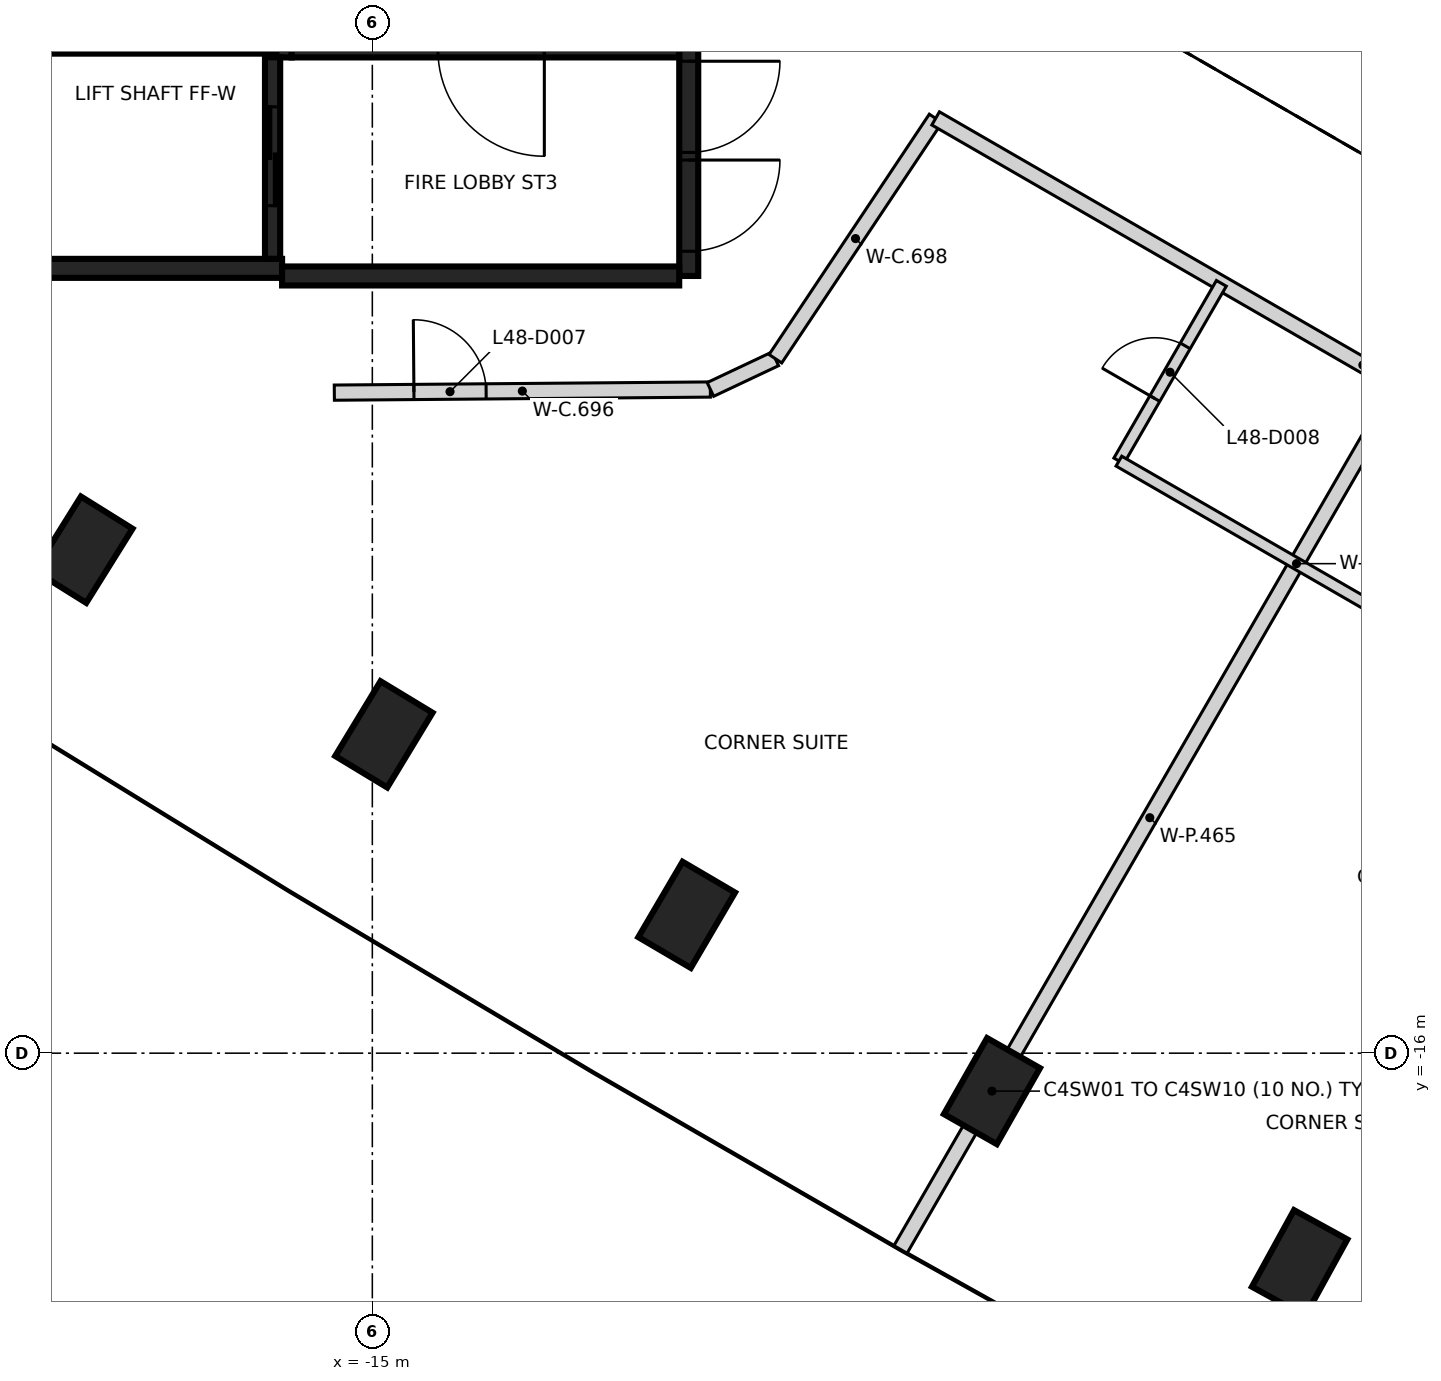
"""IFC4 building model, lengths in metres.
Left out: names, types, materials, properties, quantities, classifications, styles, units other than length and angle.
Written with IfcOpenShell. Run it as: python <this file> out.ifc"""

import sys

from ifc_helpers import new_model, si_unit, direction, frame, frame_2d, origin, origin_2d, place, context, subcontext, project, spatial, rectangle, extrude, element, fill, save


model = new_model("IFC4")
c1 = context("Model", 3, precision=1e-05, world=origin(), true_north=direction((0.0, 1.0)))
c2 = subcontext(c1, "Body", "Model", "MODEL_VIEW")
j1 = project(units=[si_unit("LENGTHUNIT", "METRE"), si_unit("PLANEANGLEUNIT", "RADIAN")], contexts=[c1])
p1 = place(None, origin())
s1 = spatial("IfcSite", under=j1, at=p1, CompositionType="ELEMENT")
p2 = place(p1, origin())
s2 = spatial("IfcBuilding", under=s1, at=p2, CompositionType="ELEMENT")
p3 = place(p2, frame((0.0, 0.0, 193.6)))
s3 = spatial("IfcBuildingStorey", under=s2, at=p3, CompositionType="ELEMENT", Elevation=193.6)
for number, where, z_axis, x_axis in (
    (1, (-18.799, -9.376, -0.35), (0.0, 0.0, 1.0), (0.529, 0.848, 0.0)),
    (2, (-14.848, -11.806, -0.35), (0.0, 0.0, 1.0), (0.518, 0.855, 0.0)),
    (3, (-10.864, -14.18, -0.35), (0.0, 0.0, 1.0), (0.506, 0.862, 0.0)),
    (4, (-6.848, -16.499, -0.35), (0.0, 0.0, 1.0), (0.494, 0.87, 0.0)),
    (5, (-2.8, -18.762, -0.35), (0.0, 0.0, 1.0), (0.482, 0.876, 0.0)),
):
    element("IfcColumn", number, at=place(p3, frame(where, z_axis=z_axis, x_axis=x_axis)), inside=s3, PredefinedType="COLUMN", context=c2, shape_type="SweptSolid", body=[
        extrude(rectangle(XDim=1.15, YDim=0.8, at=origin_2d()), origin(), (0.0, 0.0, 1.0), 3.6),
    ])
p4 = place(p3, frame((-10.837, 5.775, 0.0), z_axis=(0.0, 0.0, 1.0), x_axis=(0.0, -1.0, 0.0)))
e6 = element("IfcWall", 6, at=p4, inside=s3, PredefinedType="SHEAR", context=c2, shape_type="SweptSolid", body=[
    extrude(rectangle(XDim=11.55, YDim=0.25, at=frame_2d((5.775, 0.0))), origin(), (0.0, 0.0, 1.0), 3.25),
])
p5 = place(p4, frame((10.025, 0.0, 0.0)))
e7 = element("IfcOpeningElement", 7, at=p5, cuts=e6, PredefinedType="OPENING", context=c2, shape_type="SweptSolid", body=[
    extrude(rectangle(XDim=1.2, YDim=2.1, at=frame_2d((0.6, 1.05))), frame((0.0, 0.135, 0.0), z_axis=(0.0, -1.0, 0.0), x_axis=(1.0, 0.0, 0.0)), (0.0, 0.0, 1.0), 0.27),
])
p6 = place(p4, frame((8.725, 0.0, 0.0)))
e8 = element("IfcOpeningElement", 8, at=p6, cuts=e6, PredefinedType="OPENING", context=c2, shape_type="SweptSolid", body=[
    extrude(rectangle(XDim=1.2, YDim=2.1, at=frame_2d((0.6, 1.05))), frame((0.0, 0.135, 0.0), z_axis=(0.0, -1.0, 0.0), x_axis=(1.0, 0.0, 0.0)), (0.0, 0.0, 1.0), 0.27),
])
p7 = place(p3, frame((-16.187, -5.675, 0.0), z_axis=(0.0, 0.0, 1.0), x_axis=(-1.0, 0.0, 0.0)))
e9 = element("IfcWall", 9, at=p7, inside=s3, PredefinedType="SHEAR", context=c2, shape_type="SweptSolid", body=[
    extrude(rectangle(XDim=6.125, YDim=0.25, at=frame_2d((3.062, 0.0))), origin(), (0.0, 0.0, 1.0), 3.25),
])
p8 = place(p7, frame((3.563, 0.0, 0.0)))
e10 = element("IfcOpeningElement", 10, at=p8, cuts=e9, PredefinedType="OPENING", context=c2, shape_type="SweptSolid", body=[
    extrude(rectangle(XDim=1.0, YDim=2.1, at=frame_2d((0.5, 1.05))), frame((0.0, 0.135, 0.0), z_axis=(0.0, -1.0, 0.0), x_axis=(1.0, 0.0, 0.0)), (0.0, 0.0, 1.0), 0.27),
])
p9 = place(p3, frame((-10.963, -5.775, 0.0), z_axis=(0.0, 0.0, 1.0), x_axis=(-1.0, 0.0, 0.0)))
e11 = element("IfcWall", 11, at=p9, inside=s3, PredefinedType="SHEAR", context=c2, shape_type="SweptSolid", body=[
    extrude(rectangle(XDim=5.225, YDim=0.25, at=frame_2d((2.612, 0.0))), origin(), (0.0, 0.0, 1.0), 3.25),
])
p10 = place(p3, frame((-16.162, 3.074, 0.0), z_axis=(0.0, 0.0, 1.0), x_axis=(0.0, -1.0, 0.0)))
e12 = element("IfcWall", 12, at=p10, inside=s3, PredefinedType="SHEAR", context=c2, shape_type="SweptSolid", body=[
    extrude(rectangle(XDim=5.974, YDim=0.2, at=frame_2d((2.987, 0.0))), origin(), (0.0, 0.0, 1.0), 3.25),
])
p11 = place(p3, frame((-10.963, -2.8, 0.0), z_axis=(0.0, 0.0, 1.0), x_axis=(-1.0, 0.0, 0.0)))
e13 = element("IfcWall", 13, at=p11, inside=s3, PredefinedType="SHEAR", context=c2, shape_type="SweptSolid", body=[
    extrude(rectangle(XDim=5.098, YDim=0.2, at=frame_2d((2.549, 0.0))), origin(), (0.0, 0.0, 1.0), 3.25),
])
p12 = place(p11, frame((1.774, 0.0, 0.0)))
e14 = element("IfcOpeningElement", 14, at=p12, cuts=e13, PredefinedType="OPENING", context=c2, shape_type="SweptSolid", body=[
    extrude(rectangle(XDim=1.4, YDim=2.1, at=frame_2d((0.7, 1.05))), frame((0.0, 0.11, 0.0), z_axis=(0.0, -1.0, 0.0), x_axis=(1.0, 0.0, 0.0)), (0.0, 0.0, 1.0), 0.22),
])
p13 = place(p3, frame((-19.412, -2.75, 0.0), z_axis=(0.0, 0.0, 1.0), x_axis=(1.0, 0.0, 0.0)))
e15 = element("IfcWall", 15, at=p13, inside=s3, PredefinedType="SHEAR", context=c2, shape_type="SweptSolid", body=[
    extrude(rectangle(XDim=3.1, YDim=0.2, at=frame_2d((1.55, 0.0))), origin(), (0.0, 0.0, 1.0), 3.25),
])
p14 = place(p3, frame((-16.312, -2.898, 0.0), z_axis=(0.0, 0.0, 1.0), x_axis=(0.0, -1.0, 0.0)))
e16 = element("IfcWall", 16, at=p14, inside=s3, PredefinedType="SHEAR", context=c2, shape_type="SweptSolid", body=[
    extrude(rectangle(XDim=2.651, YDim=0.2, at=frame_2d((1.325, 0.0))), origin(), (0.0, 0.0, 1.0), 3.25),
])
p15 = place(p14, frame((0.652, 0.0, 0.0)))
e17 = element("IfcOpeningElement", 17, at=p15, cuts=e16, PredefinedType="OPENING", context=c2, shape_type="SweptSolid", body=[
    extrude(rectangle(XDim=1.3, YDim=2.1, at=frame_2d((0.65, 1.05))), frame((0.0, 0.11, 0.0), z_axis=(0.0, -1.0, 0.0), x_axis=(1.0, 0.0, 0.0)), (0.0, 0.0, 1.0), 0.22),
])
p16 = place(p3, frame((-15.5, -7.31, 0.0), z_axis=(0.0, 0.0, 1.0), x_axis=(0.999965631649, 0.008290688749, 0.0)))
e18 = element("IfcWall", 18, at=p16, inside=s3, PredefinedType="PARTITIONING", context=c2, shape_type="SweptSolid", body=[
    extrude(rectangle(XDim=4.947, YDim=0.2, at=frame_2d((2.474, 0.0))), origin(), (0.0, 0.0, 1.0), 3.25),
])
p17 = place(p16, frame((1.047, 0.0, 0.0)))
e19 = element("IfcOpeningElement", 19, at=p17, cuts=e18, PredefinedType="OPENING", context=c2, shape_type="SweptSolid", body=[
    extrude(rectangle(XDim=0.95, YDim=2.1, at=frame_2d((0.475, 1.05))), frame((0.0, 0.11, 0.0), z_axis=(0.0, -1.0, 0.0), x_axis=(1.0, 0.0, 0.0)), (0.0, 0.0, 1.0), 0.22),
])
p18 = place(p3, frame((-10.552, -7.268, 0.0), z_axis=(0.0, 0.0, 1.0), x_axis=(0.904331815333, 0.426830139255, 0.0)))
e20 = element("IfcWall", 20, at=p18, inside=s3, PredefinedType="PARTITIONING", context=c2, shape_type="SweptSolid", body=[
    extrude(rectangle(XDim=0.944, YDim=0.2, at=frame_2d((0.472, 0.0))), origin(), (0.0, 0.0, 1.0), 3.25),
])
p19 = place(p3, frame((-9.697, -6.864, 0.0), z_axis=(0.0, 0.0, 1.0), x_axis=(0.554670545446, 0.832070060761, 0.0)))
e21 = element("IfcWall", 21, at=p19, inside=s3, PredefinedType="PARTITIONING", context=c2, shape_type="SweptSolid", body=[
    extrude(rectangle(XDim=3.8, YDim=0.2, at=frame_2d((1.9, 0.0))), origin(), (0.0, 0.0, 1.0), 3.25),
])
p20 = place(p3, frame((-7.589, -3.702, 0.0), z_axis=(0.0, 0.0, 1.0), x_axis=(0.86602490244, -0.500000868353, 0.0)))
e22 = element("IfcWall", 22, at=p20, inside=s3, PredefinedType="PARTITIONING", context=c2, shape_type="SweptSolid", body=[
    extrude(rectangle(XDim=12.98, YDim=0.2, at=frame_2d((6.49, 0.0))), origin(), (0.0, 0.0, 1.0), 3.25),
])
p21 = place(p20, frame((11.8, 0.0, 0.0)))
e23 = element("IfcOpeningElement", 23, at=p21, cuts=e22, PredefinedType="OPENING", context=c2, shape_type="SweptSolid", body=[
    extrude(rectangle(XDim=0.95, YDim=2.1, at=frame_2d((0.475, 1.05))), frame((0.0, 0.11, 0.0), z_axis=(0.0, -1.0, 0.0), x_axis=(1.0, 0.0, 0.0)), (0.0, 0.0, 1.0), 0.22),
])
p22 = place(p3, frame((-8.051, -18.582, 0.0), z_axis=(0.0, 0.0, 1.0), x_axis=(0.500024249232, 0.866011403031, 0.0)))
e24 = element("IfcWall", 24, at=p22, inside=s3, PredefinedType="PARTITIONING", context=c2, shape_type="SweptSolid", body=[
    extrude(rectangle(XDim=13.118, YDim=0.2, at=frame_2d((6.559, 0.0))), origin(), (0.0, 0.0, 1.0), 3.25),
])
p23 = place(p3, frame((-5.179, -8.208, 0.0), z_axis=(0.0, 0.0, 1.0), x_axis=(0.500061949227, 0.865989634427, 0.0)))
e25 = element("IfcWall", 25, at=p23, inside=s3, PredefinedType="PARTITIONING", context=c2, shape_type="SweptSolid", body=[
    extrude(rectangle(XDim=2.698, YDim=0.15, at=frame_2d((1.349, 0.0))), origin(), (0.0, 0.0, 1.0), 3.25),
])
p24 = place(p23, frame((0.948, 0.0, 0.0)))
e26 = element("IfcOpeningElement", 26, at=p24, cuts=e25, PredefinedType="OPENING", context=c2, shape_type="SweptSolid", body=[
    extrude(rectangle(XDim=0.8, YDim=2.1, at=frame_2d((0.4, 1.05))), frame((0.0, 0.085, 0.0), z_axis=(0.0, -1.0, 0.0), x_axis=(1.0, 0.0, 0.0)), (0.0, 0.0, 1.0), 0.17),
])
p25 = place(p3, frame((-5.178, -8.211, 0.0), z_axis=(0.0, 0.0, 1.0), x_axis=(0.866046199912, -0.49996397832, 0.0)))
e27 = element("IfcWall", 27, at=p25, inside=s3, PredefinedType="PARTITIONING", context=c2, shape_type="SweptSolid", body=[
    extrude(rectangle(XDim=5.396, YDim=0.15, at=frame_2d((2.698, 0.0))), origin(), (0.0, 0.0, 1.0), 3.25),
])
p26 = place(p15, origin())
e28 = element("IfcDoor", 28, at=p26, inside=s3, OperationType="SLIDING_TO_LEFT", PredefinedType="DOOR", context=c2, shape_type="SweptSolid", body=[
    extrude(rectangle(XDim=1.3, YDim=2.1, at=frame_2d((0.65, 1.05))), frame((0.0, 0.025, 0.0), z_axis=(0.0, -1.0, 0.0), x_axis=(1.0, 0.0, 0.0)), (0.0, 0.0, 1.0), 0.05),
])
fill(e17, e28)
p27 = place(p5, origin())
e29 = element("IfcDoor", 29, at=p27, inside=s3, OperationType="SINGLE_SWING_LEFT", PredefinedType="DOOR", context=c2, shape_type="SweptSolid", body=[
    extrude(rectangle(XDim=1.2, YDim=2.1, at=frame_2d((0.6, 1.05))), frame((0.0, 0.025, 0.0), z_axis=(0.0, -1.0, 0.0), x_axis=(1.0, 0.0, 0.0)), (0.0, 0.0, 1.0), 0.05),
])
fill(e7, e29)
p28 = place(p6, origin())
e30 = element("IfcDoor", 30, at=p28, inside=s3, OperationType="SINGLE_SWING_RIGHT", PredefinedType="DOOR", context=c2, shape_type="SweptSolid", body=[
    extrude(rectangle(XDim=1.2, YDim=2.1, at=frame_2d((0.6, 1.05))), frame((0.0, 0.025, 0.0), z_axis=(0.0, -1.0, 0.0), x_axis=(1.0, 0.0, 0.0)), (0.0, 0.0, 1.0), 0.05),
])
fill(e8, e30)
p29 = place(p17, frame((0.95, 0.0, 0.0), z_axis=(0.0, 0.0, 1.0), x_axis=(-1.0, 0.0, 0.0)))
e31 = element("IfcDoor", 31, at=p29, inside=s3, OperationType="SINGLE_SWING_LEFT", PredefinedType="DOOR", context=c2, shape_type="SweptSolid", body=[
    extrude(rectangle(XDim=0.95, YDim=2.1, at=frame_2d((0.475, 1.05))), frame((0.0, 0.025, 0.0), z_axis=(0.0, -1.0, 0.0), x_axis=(1.0, 0.0, 0.0)), (0.0, 0.0, 1.0), 0.05),
])
fill(e19, e31)
p30 = place(p24, origin())
e32 = element("IfcDoor", 32, at=p30, inside=s3, OperationType="SINGLE_SWING_LEFT", PredefinedType="DOOR", context=c2, shape_type="SweptSolid", body=[
    extrude(rectangle(XDim=0.8, YDim=2.1, at=frame_2d((0.4, 1.05))), frame((0.0, 0.025, 0.0), z_axis=(0.0, -1.0, 0.0), x_axis=(1.0, 0.0, 0.0)), (0.0, 0.0, 1.0), 0.05),
])
fill(e26, e32)
save(model, sys.argv[1])
